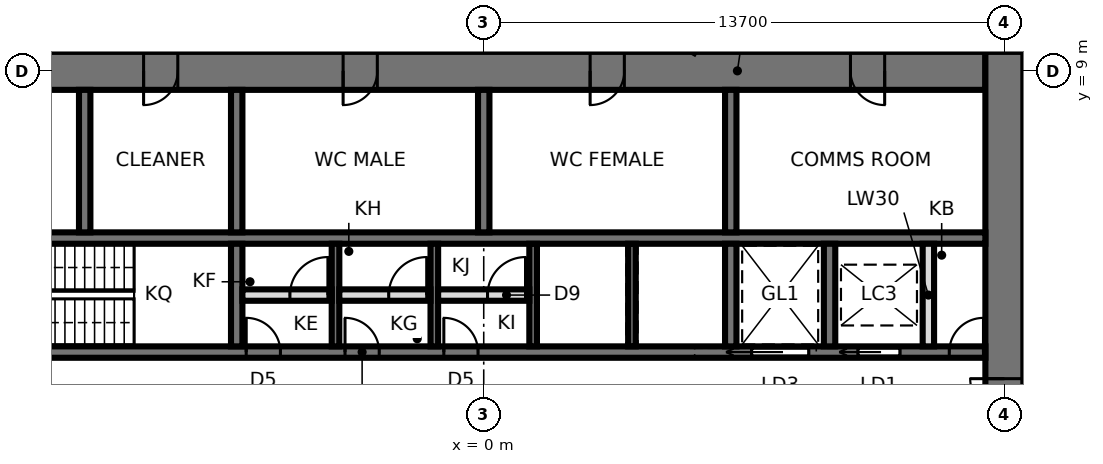
"""IFC4 building model, lengths in metres.
Left out: names, types, materials, properties, quantities, classifications, styles, units other than length and angle.
Written with IfcOpenShell. Run it as: python <this file> out.ifc"""

import sys

from ifc_helpers import new_model, si_unit, direction, frame, frame_2d, origin, place, context, subcontext, project, spatial, rectangle, extrude, element, fill, save


model = new_model("IFC4")
c1 = context("Model", 3, precision=1e-05, world=origin(), true_north=direction((0.0, 1.0)))
c2 = subcontext(c1, "Body", "Model", "MODEL_VIEW")
j1 = project(units=[si_unit("LENGTHUNIT", "METRE"), si_unit("PLANEANGLEUNIT", "RADIAN")], contexts=[c1])
p1 = place(None, origin())
s1 = spatial("IfcSite", under=j1, at=p1, CompositionType="ELEMENT")
p2 = place(p1, origin())
s2 = spatial("IfcBuilding", under=s1, at=p2, CompositionType="ELEMENT")
p3 = place(p2, frame((0.0, 0.0, 242.3)))
s3 = spatial("IfcBuildingStorey", under=s2, at=p3, CompositionType="ELEMENT", Elevation=242.3)
p4 = place(p3, frame((13.2, 9.0, 0.0), z_axis=(0.0, 0.0, 1.0), x_axis=(-1.0, 0.0, 0.0)))
e1 = element("IfcWall", 1, at=p4, inside=s3, PredefinedType="SHEAR", context=c2, shape_type="SweptSolid", body=[
    extrude(rectangle(XDim=26.4, YDim=1.0, at=frame_2d((13.2, 0.0))), origin(), (0.0, 0.0, 1.0), 3.9),
])
p5 = place(p4, frame((2.65, 0.0, 0.0)))
e2 = element("IfcOpeningElement", 2, at=p5, cuts=e1, PredefinedType="OPENING", context=c2, shape_type="SweptSolid", body=[
    extrude(rectangle(XDim=0.9, YDim=2.1, at=frame_2d((0.45, 1.05))), frame((0.0, 0.51, 0.0), z_axis=(0.0, -1.0, 0.0), x_axis=(1.0, 0.0, 0.0)), (0.0, 0.0, 1.0), 1.02),
])
p6 = place(p4, frame((9.5, 0.0, 0.0)))
e3 = element("IfcOpeningElement", 3, at=p6, cuts=e1, PredefinedType="OPENING", context=c2, shape_type="SweptSolid", body=[
    extrude(rectangle(XDim=0.9, YDim=2.1, at=frame_2d((0.45, 1.05))), frame((0.0, 0.51, 0.0), z_axis=(0.0, -1.0, 0.0), x_axis=(1.0, 0.0, 0.0)), (0.0, 0.0, 1.0), 1.02),
])
p7 = place(p4, frame((16.0, 0.0, 0.0)))
e4 = element("IfcOpeningElement", 4, at=p7, cuts=e1, PredefinedType="OPENING", context=c2, shape_type="SweptSolid", body=[
    extrude(rectangle(XDim=0.9, YDim=2.1, at=frame_2d((0.45, 1.05))), frame((0.0, 0.51, 0.0), z_axis=(0.0, -1.0, 0.0), x_axis=(1.0, 0.0, 0.0)), (0.0, 0.0, 1.0), 1.02),
])
p8 = place(p4, frame((21.25, 0.0, 0.0)))
e5 = element("IfcOpeningElement", 5, at=p8, cuts=e1, PredefinedType="OPENING", context=c2, shape_type="SweptSolid", body=[
    extrude(rectangle(XDim=0.9, YDim=2.1, at=frame_2d((0.45, 1.05))), frame((0.0, 0.51, 0.0), z_axis=(0.0, -1.0, 0.0), x_axis=(1.0, 0.0, 0.0)), (0.0, 0.0, 1.0), 1.02),
])
p9 = place(p4, frame((24.8, 0.0, 0.0)))
e6 = element("IfcOpeningElement", 6, at=p9, cuts=e1, PredefinedType="OPENING", context=c2, shape_type="SweptSolid", body=[
    extrude(rectangle(XDim=1.0, YDim=2.1, at=frame_2d((0.5, 1.05))), frame((0.0, 0.51, 0.0), z_axis=(0.0, -1.0, 0.0), x_axis=(1.0, 0.0, 0.0)), (0.0, 0.0, 1.0), 1.02),
])
p10 = place(p3, frame((13.7, -9.5, 0.0), z_axis=(0.0, 0.0, 1.0), x_axis=(0.0, 1.0, 0.0)))
e7 = element("IfcWall", 7, at=p10, inside=s3, PredefinedType="SHEAR", context=c2, shape_type="SweptSolid", body=[
    extrude(rectangle(XDim=19.0, YDim=1.0, at=frame_2d((9.5, 0.0))), origin(), (0.0, 0.0, 1.0), 3.9),
])
p11 = place(p10, frame((8.6, 0.0, 0.0)))
e8 = element("IfcOpeningElement", 8, at=p11, cuts=e7, PredefinedType="OPENING", context=c2, shape_type="SweptSolid", body=[
    extrude(rectangle(XDim=1.8, YDim=2.4, at=frame_2d((0.9, 1.2))), frame((0.0, 0.51, 0.0), z_axis=(0.0, -1.0, 0.0), x_axis=(1.0, 0.0, 0.0)), (0.0, 0.0, 1.0), 1.02),
])
p12 = place(p3, frame((-13.2, 1.6, 0.0), z_axis=(0.0, 0.0, 1.0), x_axis=(1.0, 0.0, 0.0)))
e9 = element("IfcWall", 9, at=p12, inside=s3, PredefinedType="SHEAR", context=c2, shape_type="SweptSolid", body=[
    extrude(rectangle(XDim=26.4, YDim=0.3, at=frame_2d((13.2, 0.0))), origin(), (0.0, 0.0, 1.0), 3.9),
])
p13 = place(p12, frame((0.25, 0.0, 0.0)))
e10 = element("IfcOpeningElement", 10, at=p13, cuts=e9, PredefinedType="OPENING", context=c2, shape_type="SweptSolid", body=[
    extrude(rectangle(XDim=1.0, YDim=2.1, at=frame_2d((0.5, 1.05))), frame((0.0, 0.16, 0.0), z_axis=(0.0, -1.0, 0.0), x_axis=(1.0, 0.0, 0.0)), (0.0, 0.0, 1.0), 0.32),
])
p14 = place(p12, frame((23.05, 0.0, 0.0)))
e11 = element("IfcOpeningElement", 11, at=p14, cuts=e9, PredefinedType="OPENING", context=c2, shape_type="SweptSolid", body=[
    extrude(rectangle(XDim=1.1, YDim=2.3, at=frame_2d((0.55, 1.15))), frame((0.0, 0.16, 0.0), z_axis=(0.0, -1.0, 0.0), x_axis=(1.0, 0.0, 0.0)), (0.0, 0.0, 1.0), 0.32),
])
p15 = place(p12, frame((20.25, 0.0, 0.0)))
e12 = element("IfcOpeningElement", 12, at=p15, cuts=e9, PredefinedType="OPENING", context=c2, shape_type="SweptSolid", body=[
    extrude(rectangle(XDim=1.5, YDim=2.4, at=frame_2d((0.75, 1.2))), frame((0.0, 0.16, 0.0), z_axis=(0.0, -1.0, 0.0), x_axis=(1.0, 0.0, 0.0)), (0.0, 0.0, 1.0), 0.32),
])
p16 = place(p12, frame((6.95, 0.0, 0.0)))
e13 = element("IfcOpeningElement", 13, at=p16, cuts=e9, PredefinedType="OPENING", context=c2, shape_type="SweptSolid", body=[
    extrude(rectangle(XDim=0.9, YDim=2.1, at=frame_2d((0.45, 1.05))), frame((0.0, 0.16, 0.0), z_axis=(0.0, -1.0, 0.0), x_axis=(1.0, 0.0, 0.0)), (0.0, 0.0, 1.0), 0.32),
])
p17 = place(p12, frame((9.55, 0.0, 0.0)))
e14 = element("IfcOpeningElement", 14, at=p17, cuts=e9, PredefinedType="OPENING", context=c2, shape_type="SweptSolid", body=[
    extrude(rectangle(XDim=0.9, YDim=2.1, at=frame_2d((0.45, 1.05))), frame((0.0, 0.16, 0.0), z_axis=(0.0, -1.0, 0.0), x_axis=(1.0, 0.0, 0.0)), (0.0, 0.0, 1.0), 0.32),
])
p18 = place(p12, frame((12.15, 0.0, 0.0)))
e15 = element("IfcOpeningElement", 15, at=p18, cuts=e9, PredefinedType="OPENING", context=c2, shape_type="SweptSolid", body=[
    extrude(rectangle(XDim=0.9, YDim=2.1, at=frame_2d((0.45, 1.05))), frame((0.0, 0.16, 0.0), z_axis=(0.0, -1.0, 0.0), x_axis=(1.0, 0.0, 0.0)), (0.0, 0.0, 1.0), 0.32),
])
p19 = place(p12, frame((25.45, 0.0, 0.0)))
e16 = element("IfcOpeningElement", 16, at=p19, cuts=e9, PredefinedType="OPENING", context=c2, shape_type="SweptSolid", body=[
    extrude(rectangle(XDim=0.9, YDim=2.1, at=frame_2d((0.45, 1.05))), frame((0.0, 0.16, 0.0), z_axis=(0.0, -1.0, 0.0), x_axis=(1.0, 0.0, 0.0)), (0.0, 0.0, 1.0), 0.32),
])
p20 = place(p3, frame((-13.2, 4.6, 0.0), z_axis=(0.0, 0.0, 1.0), x_axis=(1.0, 0.0, 0.0)))
e17 = element("IfcWall", 17, at=p20, inside=s3, PredefinedType="SHEAR", context=c2, shape_type="SweptSolid", body=[
    extrude(rectangle(XDim=26.4, YDim=0.3, at=frame_2d((13.2, 0.0))), origin(), (0.0, 0.0, 1.0), 3.9),
])
p21 = place(p3, frame((-6.5, 1.75, 0.0), z_axis=(0.0, 0.0, 1.0), x_axis=(0.0, 1.0, 0.0)))
e18 = element("IfcWall", 18, at=p21, inside=s3, PredefinedType="SHEAR", context=c2, shape_type="SweptSolid", body=[
    extrude(rectangle(XDim=2.7, YDim=0.3, at=frame_2d((1.35, 0.0))), origin(), (0.0, 0.0, 1.0), 3.9),
])
p22 = place(p3, frame((-6.5, 4.75, 0.0), z_axis=(0.0, 0.0, 1.0), x_axis=(0.0, 1.0, 0.0)))
e19 = element("IfcWall", 19, at=p22, inside=s3, PredefinedType="SHEAR", context=c2, shape_type="SweptSolid", body=[
    extrude(rectangle(XDim=3.75, YDim=0.3, at=frame_2d((1.875, 0.0))), origin(), (0.0, 0.0, 1.0), 3.9),
])
p23 = place(p3, frame((6.5, 1.75, 0.0), z_axis=(0.0, 0.0, 1.0), x_axis=(0.0, 1.0, 0.0)))
e20 = element("IfcWall", 20, at=p23, inside=s3, PredefinedType="SHEAR", context=c2, shape_type="SweptSolid", body=[
    extrude(rectangle(XDim=2.7, YDim=0.3, at=frame_2d((1.35, 0.0))), origin(), (0.0, 0.0, 1.0), 3.9),
])
p24 = place(p3, frame((6.5, 4.75, 0.0), z_axis=(0.0, 0.0, 1.0), x_axis=(0.0, 1.0, 0.0)))
e21 = element("IfcWall", 21, at=p24, inside=s3, PredefinedType="SHEAR", context=c2, shape_type="SweptSolid", body=[
    extrude(rectangle(XDim=3.75, YDim=0.3, at=frame_2d((1.875, 0.0))), origin(), (0.0, 0.0, 1.0), 3.9),
])
for number, where, z_axis, x_axis in (
    (22, (-3.9, 1.75, 0.0), (0.0, 0.0, 1.0), (0.0, 1.0, 0.0)),
    (23, (-1.3, 1.75, 0.0), (0.0, 0.0, 1.0), (0.0, 1.0, 0.0)),
    (24, (1.3, 1.75, 0.0), (0.0, 0.0, 1.0), (0.0, 1.0, 0.0)),
    (25, (3.9, 1.75, 0.0), (0.0, 0.0, 1.0), (0.0, 1.0, 0.0)),
):
    element("IfcWall", number, at=place(p3, frame(where, z_axis=z_axis, x_axis=x_axis)), inside=s3, PredefinedType="SHEAR", context=c2, shape_type="SweptSolid", body=[
        extrude(rectangle(XDim=2.7, YDim=0.2, at=frame_2d((1.35, 0.0))), origin(), (0.0, 0.0, 1.0), 3.9),
    ])
for number, where, z_axis, x_axis in (
    (26, (0.0, 4.75, 0.0), (0.0, 0.0, 1.0), (0.0, 1.0, 0.0)),
    (27, (-10.5, 4.75, 0.0), (0.0, 0.0, 1.0), (0.0, 1.0, 0.0)),
):
    element("IfcWall", number, at=place(p3, frame(where, z_axis=z_axis, x_axis=x_axis)), inside=s3, PredefinedType="SHEAR", context=c2, shape_type="SweptSolid", body=[
        extrude(rectangle(XDim=3.75, YDim=0.3, at=frame_2d((1.875, 0.0))), origin(), (0.0, 0.0, 1.0), 3.9),
    ])
p25 = place(p3, frame((9.1, 1.75, 0.0), z_axis=(0.0, 0.0, 1.0), x_axis=(0.0, 1.0, 0.0)))
e28 = element("IfcWall", 28, at=p25, inside=s3, PredefinedType="SHEAR", context=c2, shape_type="SweptSolid", body=[
    extrude(rectangle(XDim=2.7, YDim=0.3, at=frame_2d((1.35, 0.0))), origin(), (0.0, 0.0, 1.0), 3.9),
])
p26 = place(p3, frame((-6.35, 3.1, 0.0), z_axis=(0.0, 0.0, 1.0), x_axis=(1.0, 0.0, 0.0)))
e29 = element("IfcWall", 29, at=p26, inside=s3, PredefinedType="PARTITIONING", context=c2, shape_type="SweptSolid", body=[
    extrude(rectangle(XDim=2.35, YDim=0.3, at=frame_2d((1.175, 0.0))), origin(), (0.0, 0.0, 1.0), 3.7),
])
p27 = place(p26, frame((1.25, 0.0, 0.0)))
e30 = element("IfcOpeningElement", 30, at=p27, cuts=e29, PredefinedType="OPENING", context=c2, shape_type="SweptSolid", body=[
    extrude(rectangle(XDim=1.0, YDim=2.4, at=frame_2d((0.5, 1.2))), frame((0.0, 0.16, 0.0), z_axis=(0.0, -1.0, 0.0), x_axis=(1.0, 0.0, 0.0)), (0.0, 0.0, 1.0), 0.32),
])
p28 = place(p3, frame((-3.8, 3.1, 0.0), z_axis=(0.0, 0.0, 1.0), x_axis=(1.0, 0.0, 0.0)))
e31 = element("IfcWall", 31, at=p28, inside=s3, PredefinedType="PARTITIONING", context=c2, shape_type="SweptSolid", body=[
    extrude(rectangle(XDim=2.4, YDim=0.3, at=frame_2d((1.2, 0.0))), origin(), (0.0, 0.0, 1.0), 3.7),
])
p29 = place(p28, frame((1.3, 0.0, 0.0)))
e32 = element("IfcOpeningElement", 32, at=p29, cuts=e31, PredefinedType="OPENING", context=c2, shape_type="SweptSolid", body=[
    extrude(rectangle(XDim=1.0, YDim=2.4, at=frame_2d((0.5, 1.2))), frame((0.0, 0.16, 0.0), z_axis=(0.0, -1.0, 0.0), x_axis=(1.0, 0.0, 0.0)), (0.0, 0.0, 1.0), 0.32),
])
p30 = place(p3, frame((-1.2, 3.1, 0.0), z_axis=(0.0, 0.0, 1.0), x_axis=(1.0, 0.0, 0.0)))
e33 = element("IfcWall", 33, at=p30, inside=s3, PredefinedType="PARTITIONING", context=c2, shape_type="SweptSolid", body=[
    extrude(rectangle(XDim=2.4, YDim=0.3, at=frame_2d((1.2, 0.0))), origin(), (0.0, 0.0, 1.0), 3.7),
])
p31 = place(p30, frame((1.3, 0.0, 0.0)))
e34 = element("IfcOpeningElement", 34, at=p31, cuts=e33, PredefinedType="OPENING", context=c2, shape_type="SweptSolid", body=[
    extrude(rectangle(XDim=1.0, YDim=2.4, at=frame_2d((0.5, 1.2))), frame((0.0, 0.16, 0.0), z_axis=(0.0, -1.0, 0.0), x_axis=(1.0, 0.0, 0.0)), (0.0, 0.0, 1.0), 0.32),
])
p32 = place(p3, frame((11.7, 1.75, 0.0), z_axis=(0.0, 0.0, 1.0), x_axis=(0.0, 1.0, 0.0)))
e35 = element("IfcWall", 35, at=p32, inside=s3, PredefinedType="SOLIDWALL", context=c2, shape_type="SweptSolid", body=[
    extrude(rectangle(XDim=2.7, YDim=0.3, at=frame_2d((1.35, 0.0))), origin(), (0.0, 0.0, 1.0), 3.7),
])
p33 = place(p3, frame((5.485, 9.5, 0.0), z_axis=(0.0, 0.0, 1.0), x_axis=(0.499929208183, 0.866066271601, 0.0)))
e36 = element("IfcWall", 36, at=p33, inside=s3, PredefinedType="PARTITIONING", context=c2, shape_type="SweptSolid", body=[
    extrude(rectangle(XDim=2.078, YDim=0.12, at=frame_2d((1.039, 0.0))), origin(), (0.0, 0.0, 1.0), 3.7),
])
p34 = place(p11, origin())
e37 = element("IfcDoor", 37, at=p34, inside=s3, OperationType="DOUBLE_DOOR_SINGLE_SWING", PredefinedType="DOOR", context=c2, shape_type="SweptSolid", body=[
    extrude(rectangle(XDim=1.72, YDim=2.36, at=frame_2d((0.9, 1.18))), frame((0.0, 0.025, 0.0), z_axis=(0.0, -1.0, 0.0), x_axis=(1.0, 0.0, 0.0)), (0.0, 0.0, 1.0), 0.05),
    extrude(rectangle(XDim=0.04, YDim=2.4, at=frame_2d((0.02, 1.2))), frame((0.0, 0.25, 0.0), z_axis=(0.0, -1.0, 0.0), x_axis=(1.0, 0.0, 0.0)), (0.0, 0.0, 1.0), 0.5),
    extrude(rectangle(XDim=0.04, YDim=2.4, at=frame_2d((1.78, 1.2))), frame((0.0, 0.25, 0.0), z_axis=(0.0, -1.0, 0.0), x_axis=(1.0, 0.0, 0.0)), (0.0, 0.0, 1.0), 0.5),
    extrude(rectangle(XDim=1.72, YDim=0.04, at=frame_2d((0.9, 2.38))), frame((0.0, 0.25, 0.0), z_axis=(0.0, -1.0, 0.0), x_axis=(1.0, 0.0, 0.0)), (0.0, 0.0, 1.0), 0.5),
])
fill(e8, e37)
p35 = place(p14, origin())
e38 = element("IfcDoor", 38, at=p35, inside=s3, OperationType="SLIDING_TO_LEFT", PredefinedType="DOOR", context=c2, shape_type="SweptSolid", body=[
    extrude(rectangle(XDim=1.1, YDim=2.3, at=frame_2d((0.55, 1.15))), frame((0.0, 0.025, 0.0), z_axis=(0.0, -1.0, 0.0), x_axis=(1.0, 0.0, 0.0)), (0.0, 0.0, 1.0), 0.05),
])
fill(e11, e38)
p36 = place(p15, origin())
e39 = element("IfcDoor", 39, at=p36, inside=s3, OperationType="SLIDING_TO_LEFT", PredefinedType="DOOR", context=c2, shape_type="SweptSolid", body=[
    extrude(rectangle(XDim=1.5, YDim=2.4, at=frame_2d((0.75, 1.2))), frame((0.0, 0.025, 0.0), z_axis=(0.0, -1.0, 0.0), x_axis=(1.0, 0.0, 0.0)), (0.0, 0.0, 1.0), 0.05),
])
fill(e12, e39)
p37 = place(p27, origin())
e40 = element("IfcDoor", 40, at=p37, inside=s3, OperationType="SINGLE_SWING_RIGHT", PredefinedType="DOOR", context=c2, shape_type="SweptSolid", body=[
    extrude(rectangle(XDim=1.0, YDim=2.4, at=frame_2d((0.5, 1.2))), frame((0.0, 0.025, 0.0), z_axis=(0.0, -1.0, 0.0), x_axis=(1.0, 0.0, 0.0)), (0.0, 0.0, 1.0), 0.05),
])
fill(e30, e40)
p38 = place(p16, origin())
e41 = element("IfcDoor", 41, at=p38, inside=s3, OperationType="SINGLE_SWING_LEFT", PredefinedType="DOOR", context=c2, shape_type="SweptSolid", body=[
    extrude(rectangle(XDim=0.9, YDim=2.1, at=frame_2d((0.45, 1.05))), frame((0.0, 0.025, 0.0), z_axis=(0.0, -1.0, 0.0), x_axis=(1.0, 0.0, 0.0)), (0.0, 0.0, 1.0), 0.05),
])
fill(e13, e41)
p39 = place(p29, origin())
e42 = element("IfcDoor", 42, at=p39, inside=s3, OperationType="SINGLE_SWING_RIGHT", PredefinedType="DOOR", context=c2, shape_type="SweptSolid", body=[
    extrude(rectangle(XDim=1.0, YDim=2.4, at=frame_2d((0.5, 1.2))), frame((0.0, 0.025, 0.0), z_axis=(0.0, -1.0, 0.0), x_axis=(1.0, 0.0, 0.0)), (0.0, 0.0, 1.0), 0.05),
])
fill(e32, e42)
p40 = place(p17, origin())
e43 = element("IfcDoor", 43, at=p40, inside=s3, OperationType="SINGLE_SWING_LEFT", PredefinedType="DOOR", context=c2, shape_type="SweptSolid", body=[
    extrude(rectangle(XDim=0.9, YDim=2.1, at=frame_2d((0.45, 1.05))), frame((0.0, 0.025, 0.0), z_axis=(0.0, -1.0, 0.0), x_axis=(1.0, 0.0, 0.0)), (0.0, 0.0, 1.0), 0.05),
])
fill(e14, e43)
p41 = place(p31, origin())
e44 = element("IfcDoor", 44, at=p41, inside=s3, OperationType="SINGLE_SWING_RIGHT", PredefinedType="DOOR", context=c2, shape_type="SweptSolid", body=[
    extrude(rectangle(XDim=1.0, YDim=2.4, at=frame_2d((0.5, 1.2))), frame((0.0, 0.025, 0.0), z_axis=(0.0, -1.0, 0.0), x_axis=(1.0, 0.0, 0.0)), (0.0, 0.0, 1.0), 0.05),
])
fill(e34, e44)
p42 = place(p18, origin())
e45 = element("IfcDoor", 45, at=p42, inside=s3, OperationType="SINGLE_SWING_LEFT", PredefinedType="DOOR", context=c2, shape_type="SweptSolid", body=[
    extrude(rectangle(XDim=0.9, YDim=2.1, at=frame_2d((0.45, 1.05))), frame((0.0, 0.025, 0.0), z_axis=(0.0, -1.0, 0.0), x_axis=(1.0, 0.0, 0.0)), (0.0, 0.0, 1.0), 0.05),
])
fill(e15, e45)
p43 = place(p19, origin())
e46 = element("IfcDoor", 46, at=p43, inside=s3, OperationType="SINGLE_SWING_RIGHT", PredefinedType="DOOR", context=c2, shape_type="SweptSolid", body=[
    extrude(rectangle(XDim=0.9, YDim=2.1, at=frame_2d((0.45, 1.05))), frame((0.0, 0.025, 0.0), z_axis=(0.0, -1.0, 0.0), x_axis=(1.0, 0.0, 0.0)), (0.0, 0.0, 1.0), 0.05),
])
fill(e16, e46)
p44 = place(p5, origin())
e47 = element("IfcDoor", 47, at=p44, inside=s3, OperationType="SINGLE_SWING_LEFT", PredefinedType="DOOR", context=c2, shape_type="SweptSolid", body=[
    extrude(rectangle(XDim=0.82, YDim=2.06, at=frame_2d((0.45, 1.03))), frame((0.0, 0.025, 0.0), z_axis=(0.0, -1.0, 0.0), x_axis=(1.0, 0.0, 0.0)), (0.0, 0.0, 1.0), 0.05),
    extrude(rectangle(XDim=0.04, YDim=2.1, at=frame_2d((0.02, 1.05))), frame((0.0, 0.25, 0.0), z_axis=(0.0, -1.0, 0.0), x_axis=(1.0, 0.0, 0.0)), (0.0, 0.0, 1.0), 0.5),
    extrude(rectangle(XDim=0.04, YDim=2.1, at=frame_2d((0.88, 1.05))), frame((0.0, 0.25, 0.0), z_axis=(0.0, -1.0, 0.0), x_axis=(1.0, 0.0, 0.0)), (0.0, 0.0, 1.0), 0.5),
    extrude(rectangle(XDim=0.82, YDim=0.04, at=frame_2d((0.45, 2.08))), frame((0.0, 0.25, 0.0), z_axis=(0.0, -1.0, 0.0), x_axis=(1.0, 0.0, 0.0)), (0.0, 0.0, 1.0), 0.5),
])
fill(e2, e47)
p45 = place(p6, origin())
e48 = element("IfcDoor", 48, at=p45, inside=s3, OperationType="SINGLE_SWING_RIGHT", PredefinedType="DOOR", context=c2, shape_type="SweptSolid", body=[
    extrude(rectangle(XDim=0.82, YDim=2.06, at=frame_2d((0.45, 1.03))), frame((0.0, 0.025, 0.0), z_axis=(0.0, -1.0, 0.0), x_axis=(1.0, 0.0, 0.0)), (0.0, 0.0, 1.0), 0.05),
    extrude(rectangle(XDim=0.04, YDim=2.1, at=frame_2d((0.02, 1.05))), frame((0.0, 0.25, 0.0), z_axis=(0.0, -1.0, 0.0), x_axis=(1.0, 0.0, 0.0)), (0.0, 0.0, 1.0), 0.5),
    extrude(rectangle(XDim=0.04, YDim=2.1, at=frame_2d((0.88, 1.05))), frame((0.0, 0.25, 0.0), z_axis=(0.0, -1.0, 0.0), x_axis=(1.0, 0.0, 0.0)), (0.0, 0.0, 1.0), 0.5),
    extrude(rectangle(XDim=0.82, YDim=0.04, at=frame_2d((0.45, 2.08))), frame((0.0, 0.25, 0.0), z_axis=(0.0, -1.0, 0.0), x_axis=(1.0, 0.0, 0.0)), (0.0, 0.0, 1.0), 0.5),
])
fill(e3, e48)
p46 = place(p7, origin())
e49 = element("IfcDoor", 49, at=p46, inside=s3, OperationType="SINGLE_SWING_RIGHT", PredefinedType="DOOR", context=c2, shape_type="SweptSolid", body=[
    extrude(rectangle(XDim=0.82, YDim=2.06, at=frame_2d((0.45, 1.03))), frame((0.0, 0.025, 0.0), z_axis=(0.0, -1.0, 0.0), x_axis=(1.0, 0.0, 0.0)), (0.0, 0.0, 1.0), 0.05),
    extrude(rectangle(XDim=0.04, YDim=2.1, at=frame_2d((0.02, 1.05))), frame((0.0, 0.25, 0.0), z_axis=(0.0, -1.0, 0.0), x_axis=(1.0, 0.0, 0.0)), (0.0, 0.0, 1.0), 0.5),
    extrude(rectangle(XDim=0.04, YDim=2.1, at=frame_2d((0.88, 1.05))), frame((0.0, 0.25, 0.0), z_axis=(0.0, -1.0, 0.0), x_axis=(1.0, 0.0, 0.0)), (0.0, 0.0, 1.0), 0.5),
    extrude(rectangle(XDim=0.82, YDim=0.04, at=frame_2d((0.45, 2.08))), frame((0.0, 0.25, 0.0), z_axis=(0.0, -1.0, 0.0), x_axis=(1.0, 0.0, 0.0)), (0.0, 0.0, 1.0), 0.5),
])
fill(e4, e49)
p47 = place(p8, origin())
e50 = element("IfcDoor", 50, at=p47, inside=s3, OperationType="SINGLE_SWING_RIGHT", PredefinedType="DOOR", context=c2, shape_type="SweptSolid", body=[
    extrude(rectangle(XDim=0.82, YDim=2.06, at=frame_2d((0.45, 1.03))), frame((0.0, 0.025, 0.0), z_axis=(0.0, -1.0, 0.0), x_axis=(1.0, 0.0, 0.0)), (0.0, 0.0, 1.0), 0.05),
    extrude(rectangle(XDim=0.04, YDim=2.1, at=frame_2d((0.02, 1.05))), frame((0.0, 0.25, 0.0), z_axis=(0.0, -1.0, 0.0), x_axis=(1.0, 0.0, 0.0)), (0.0, 0.0, 1.0), 0.5),
    extrude(rectangle(XDim=0.04, YDim=2.1, at=frame_2d((0.88, 1.05))), frame((0.0, 0.25, 0.0), z_axis=(0.0, -1.0, 0.0), x_axis=(1.0, 0.0, 0.0)), (0.0, 0.0, 1.0), 0.5),
    extrude(rectangle(XDim=0.82, YDim=0.04, at=frame_2d((0.45, 2.08))), frame((0.0, 0.25, 0.0), z_axis=(0.0, -1.0, 0.0), x_axis=(1.0, 0.0, 0.0)), (0.0, 0.0, 1.0), 0.5),
])
fill(e5, e50)
save(model, sys.argv[1])
